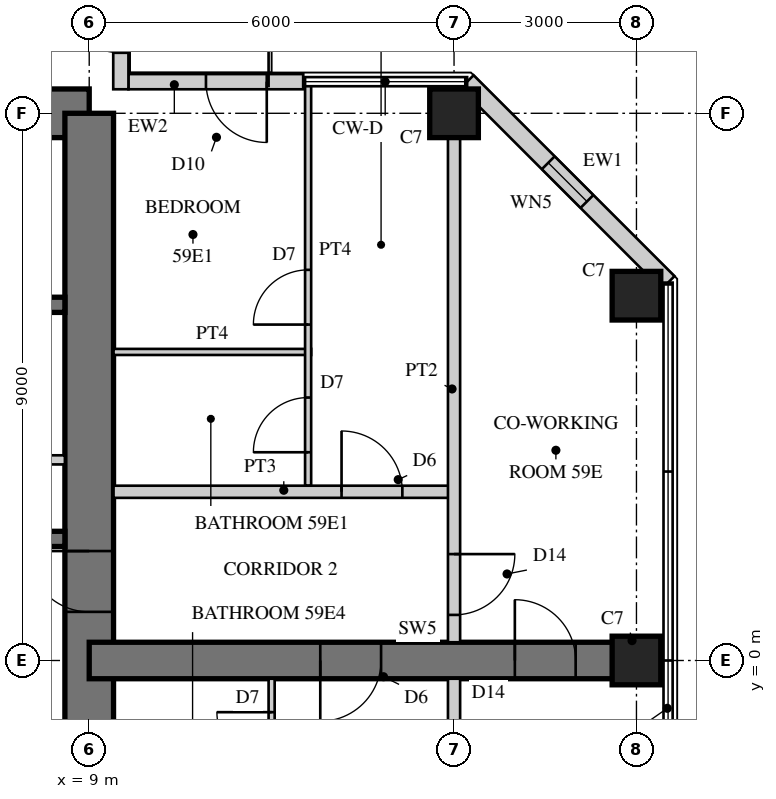
"""IFC4 building model, lengths in metres.
Left out: names, types, materials, properties, quantities, classifications, styles, units other than length and angle.
Written with IfcOpenShell. Run it as: python <this file> out.ifc"""

import sys

from ifc_helpers import new_model, si_unit, direction, frame, frame_2d, origin, origin_2d, place, context, subcontext, project, spatial, rectangle, hollow_rectangle, extrude, element, fill, save


model = new_model("IFC4")
c1 = context("Model", 3, precision=1e-05, world=origin(), true_north=direction((0.0, 1.0)))
c2 = subcontext(c1, "Body", "Model", "MODEL_VIEW")
j1 = project(units=[si_unit("LENGTHUNIT", "METRE"), si_unit("PLANEANGLEUNIT", "RADIAN")], contexts=[c1])
p1 = place(None, origin())
s1 = spatial("IfcSite", under=j1, at=p1, CompositionType="ELEMENT")
p2 = place(p1, origin())
s2 = spatial("IfcBuilding", under=s1, at=p2, CompositionType="ELEMENT")
p3 = place(p2, frame((0.0, 0.0, 232.3)))
s3 = spatial("IfcBuildingStorey", under=s2, at=p3, CompositionType="ELEMENT", Elevation=232.3)
p4 = place(p3, frame((9.0, 9.0, 0.0), z_axis=(0.0, 0.0, 1.0), x_axis=(-1.0, 0.0, 0.0)))
e1 = element("IfcWall", 1, at=p4, inside=s3, PredefinedType="SHEAR", context=c2, shape_type="SweptSolid", body=[
    extrude(rectangle(XDim=18.0, YDim=0.8, at=frame_2d((9.0, 0.0))), origin(), (0.0, 0.0, 1.0), 3.4),
])
p5 = place(p4, frame((9.8, 0.0, 0.0)))
e2 = element("IfcOpeningElement", 2, at=p5, cuts=e1, PredefinedType="OPENING", context=c2, shape_type="SweptSolid", body=[
    extrude(rectangle(XDim=1.0, YDim=2.4, at=frame_2d((0.5, 1.2))), frame((0.0, 0.41, 0.0), z_axis=(0.0, -1.0, 0.0), x_axis=(1.0, 0.0, 0.0)), (0.0, 0.0, 1.0), 0.82),
])
p6 = place(p3, frame((9.0, -9.0, 0.0), z_axis=(0.0, 0.0, 1.0), x_axis=(0.0, 1.0, 0.0)))
e3 = element("IfcWall", 3, at=p6, inside=s3, PredefinedType="SHEAR", context=c2, shape_type="SweptSolid", body=[
    extrude(rectangle(XDim=18.0, YDim=0.8, at=frame_2d((9.0, 0.0))), origin(), (0.0, 0.0, 1.0), 3.4),
])
p7 = place(p6, frame((9.8, 0.0, 0.0)))
e4 = element("IfcOpeningElement", 4, at=p7, cuts=e3, PredefinedType="OPENING", context=c2, shape_type="SweptSolid", body=[
    extrude(rectangle(XDim=1.0, YDim=2.4, at=frame_2d((0.5, 1.2))), frame((0.0, 0.41, 0.0), z_axis=(0.0, -1.0, 0.0), x_axis=(1.0, 0.0, 0.0)), (0.0, 0.0, 1.0), 0.82),
])
p8 = place(p3, frame((1.925, 2.0, 0.0), z_axis=(0.0, 0.0, 1.0), x_axis=(1.0, 0.0, 0.0)))
e5 = element("IfcWall", 5, at=p8, inside=s3, PredefinedType="SHEAR", context=c2, shape_type="SweptSolid", body=[
    extrude(rectangle(XDim=6.675, YDim=0.25, at=frame_2d((3.337, 0.0))), origin(), (0.0, 0.0, 1.0), 3.4),
])
p9 = place(p3, frame((1.925, 5.85, 0.0), z_axis=(0.0, 0.0, 1.0), x_axis=(1.0, 0.0, 0.0)))
e6 = element("IfcWall", 6, at=p9, inside=s3, PredefinedType="SHEAR", context=c2, shape_type="SweptSolid", body=[
    extrude(rectangle(XDim=6.675, YDim=0.25, at=frame_2d((3.337, 0.0))), origin(), (0.0, 0.0, 1.0), 3.4),
])
p10 = place(p9, frame((0.546, 0.0, 0.0)))
e7 = element("IfcOpeningElement", 7, at=p10, cuts=e6, PredefinedType="OPENING", context=c2, shape_type="SweptSolid", body=[
    extrude(rectangle(XDim=1.0, YDim=2.1, at=frame_2d((0.5, 1.05))), frame((0.0, 0.135, 0.0), z_axis=(0.0, -1.0, 0.0), x_axis=(1.0, 0.0, 0.0)), (0.0, 0.0, 1.0), 0.27),
])
p11 = place(p9, frame((5.129, 0.0, 0.0)))
e8 = element("IfcOpeningElement", 8, at=p11, cuts=e6, PredefinedType="OPENING", context=c2, shape_type="SweptSolid", body=[
    extrude(rectangle(XDim=1.0, YDim=2.1, at=frame_2d((0.5, 1.05))), frame((0.0, 0.135, 0.0), z_axis=(0.0, -1.0, 0.0), x_axis=(1.0, 0.0, 0.0)), (0.0, 0.0, 1.0), 0.27),
])
p12 = place(p3, frame((1.925, 3.3, 0.0), z_axis=(0.0, 0.0, 1.0), x_axis=(1.0, 0.0, 0.0)))
e9 = element("IfcWall", 9, at=p12, inside=s3, PredefinedType="PARTITIONING", context=c2, shape_type="SweptSolid", body=[
    extrude(rectangle(XDim=6.675, YDim=0.15, at=frame_2d((3.337, 0.0))), origin(), (0.0, 0.0, 1.0), 3.4),
])
p13 = place(p12, frame((0.075, 0.0, 0.0)))
e10 = element("IfcOpeningElement", 10, at=p13, cuts=e9, PredefinedType="OPENING", context=c2, shape_type="SweptSolid", body=[
    extrude(rectangle(XDim=0.8, YDim=2.1, at=frame_2d((0.4, 1.05))), frame((0.0, 0.085, 0.0), z_axis=(0.0, -1.0, 0.0), x_axis=(1.0, 0.0, 0.0)), (0.0, 0.0, 1.0), 0.17),
])
p14 = place(p12, frame((3.675, 0.0, 0.0)))
e11 = element("IfcOpeningElement", 11, at=p14, cuts=e9, PredefinedType="OPENING", context=c2, shape_type="SweptSolid", body=[
    extrude(rectangle(XDim=0.8, YDim=2.1, at=frame_2d((0.4, 1.05))), frame((0.0, 0.085, 0.0), z_axis=(0.0, -1.0, 0.0), x_axis=(1.0, 0.0, 0.0)), (0.0, 0.0, 1.0), 0.17),
])
p15 = place(p3, frame((9.0, 0.0, 0.0), z_axis=(0.0, 0.0, 1.0), x_axis=(1.0, 0.0, 0.0)))
e12 = element("IfcWall", 12, at=p15, inside=s3, PredefinedType="SHEAR", context=c2, shape_type="SweptSolid", body=[
    extrude(rectangle(XDim=9.0, YDim=0.6, at=frame_2d((4.5, 0.0))), origin(), (0.0, 0.0, 1.0), 3.4),
])
p16 = place(p15, frame((3.8, 0.0, 0.0)))
e13 = element("IfcOpeningElement", 13, at=p16, cuts=e12, PredefinedType="OPENING", context=c2, shape_type="SweptSolid", body=[
    extrude(rectangle(XDim=1.0, YDim=2.15, at=frame_2d((0.5, 1.075))), frame((0.0, 0.31, 0.0), z_axis=(0.0, -1.0, 0.0), x_axis=(1.0, 0.0, 0.0)), (0.0, 0.0, 1.0), 0.62),
])
p17 = place(p15, frame((7.0, 0.0, 0.0)))
e14 = element("IfcOpeningElement", 14, at=p17, cuts=e12, PredefinedType="OPENING", context=c2, shape_type="SweptSolid", body=[
    extrude(rectangle(XDim=1.0, YDim=2.2, at=frame_2d((0.5, 1.1))), frame((0.0, 0.31, 0.0), z_axis=(0.0, -1.0, 0.0), x_axis=(1.0, 0.0, 0.0)), (0.0, 0.0, 1.0), 0.62),
])
for number, where, z_axis, x_axis in (
    (15, (15.0, 9.0, 0.0), (0.0, 0.0, 1.0), (1.0, 0.0, 0.0)),
    (16, (18.0, 0.0, 0.0), (0.0, 0.0, 1.0), (1.0, 0.0, 0.0)),
    (17, (18.0, 6.0, 0.0), (0.0, 0.0, 1.0), (1.0, 0.0, 0.0)),
):
    element("IfcColumn", number, at=place(p3, frame(where, z_axis=z_axis, x_axis=x_axis)), inside=s3, PredefinedType="COLUMN", context=c2, shape_type="SweptSolid", body=[
        extrude(rectangle(XDim=0.8, YDim=0.8, at=origin_2d()), origin(), (0.0, 0.0, 1.0), 3.4),
    ])
p18 = place(p3, frame((18.52, 6.215, 0.0), z_axis=(0.0, 0.0, 1.0), x_axis=(-0.707106781187, 0.707106781187, 0.0)))
e18 = element("IfcWall", 18, at=p18, inside=s3, PredefinedType="SOLIDWALL", context=c2, shape_type="SweptSolid", body=[
    extrude(rectangle(XDim=4.674, YDim=0.3, at=frame_2d((2.337, 0.0))), origin(), (0.0, 0.0, 1.0), 3.22),
])
p19 = place(p18, frame((1.887, 0.0, 0.3)))
e19 = element("IfcOpeningElement", 19, at=p19, cuts=e18, PredefinedType="OPENING", context=c2, shape_type="SweptSolid", body=[
    extrude(rectangle(XDim=0.9, YDim=2.4, at=frame_2d((0.45, 1.2))), frame((0.0, 0.16, 0.0), z_axis=(0.0, -1.0, 0.0), x_axis=(1.0, 0.0, 0.0)), (0.0, 0.0, 1.0), 0.32),
])
p20 = place(p3, frame((12.52, 9.52, 0.0), z_axis=(0.0, 0.0, 1.0), x_axis=(-1.0, 0.0, 0.0)))
e20 = element("IfcWall", 20, at=p20, inside=s3, PredefinedType="SOLIDWALL", context=c2, shape_type="SweptSolid", body=[
    extrude(rectangle(XDim=2.875, YDim=0.25, at=frame_2d((1.438, 0.0))), origin(), (0.0, 0.0, 1.0), 3.22),
])
p21 = place(p20, frame((0.6, 0.0, 0.0)))
e21 = element("IfcOpeningElement", 21, at=p21, cuts=e20, PredefinedType="OPENING", context=c2, shape_type="SweptSolid", body=[
    extrude(rectangle(XDim=1.0, YDim=2.2, at=frame_2d((0.5, 1.1))), frame((0.0, 0.135, 0.0), z_axis=(0.0, -1.0, 0.0), x_axis=(1.0, 0.0, 0.0)), (0.0, 0.0, 1.0), 0.27),
])
p22 = place(p3, frame((9.52, 9.395, 0.0), z_axis=(0.0, 0.0, 1.0), x_axis=(0.0, 1.0, 0.0)))
e22 = element("IfcWall", 22, at=p22, inside=s3, PredefinedType="SOLIDWALL", context=c2, shape_type="SweptSolid", body=[
    extrude(rectangle(XDim=3.125, YDim=0.25, at=frame_2d((1.562, 0.0))), origin(), (0.0, 0.0, 1.0), 3.22),
])
p23 = place(p22, frame((0.6, 0.0, 0.0)))
e23 = element("IfcOpeningElement", 23, at=p23, cuts=e22, PredefinedType="OPENING", context=c2, shape_type="SweptSolid", body=[
    extrude(rectangle(XDim=1.0, YDim=2.2, at=frame_2d((0.5, 1.1))), frame((0.0, 0.135, 0.0), z_axis=(0.0, -1.0, 0.0), x_axis=(1.0, 0.0, 0.0)), (0.0, 0.0, 1.0), 0.27),
])
p24 = place(p3, frame((9.4, 5.075, 0.0), z_axis=(0.0, 0.0, 1.0), x_axis=(1.0, 0.0, 0.0)))
e24 = element("IfcWall", 24, at=p24, inside=s3, PredefinedType="PARTITIONING", context=c2, shape_type="SweptSolid", body=[
    extrude(rectangle(XDim=3.25, YDim=0.1, at=frame_2d((1.625, 0.0))), origin(), (0.0, 0.0, 1.0), 3.22),
])
p25 = place(p3, frame((12.6, 2.875, 0.0), z_axis=(0.0, 0.0, 1.0), x_axis=(0.0, 1.0, 0.0)))
e25 = element("IfcWall", 25, at=p25, inside=s3, PredefinedType="PARTITIONING", context=c2, shape_type="SweptSolid", body=[
    extrude(rectangle(XDim=6.605, YDim=0.1, at=frame_2d((3.302, 0.0))), origin(), (0.0, 0.0, 1.0), 3.22),
])
p26 = place(p25, frame((0.55, 0.0, 0.0)))
e26 = element("IfcOpeningElement", 26, at=p26, cuts=e25, PredefinedType="OPENING", context=c2, shape_type="SweptSolid", body=[
    extrude(rectangle(XDim=0.9, YDim=2.1, at=frame_2d((0.45, 1.05))), frame((0.0, 0.06, 0.0), z_axis=(0.0, -1.0, 0.0), x_axis=(1.0, 0.0, 0.0)), (0.0, 0.0, 1.0), 0.12),
])
p27 = place(p25, frame((2.65, 0.0, 0.0)))
e27 = element("IfcOpeningElement", 27, at=p27, cuts=e25, PredefinedType="OPENING", context=c2, shape_type="SweptSolid", body=[
    extrude(rectangle(XDim=0.9, YDim=2.1, at=frame_2d((0.45, 1.05))), frame((0.0, 0.06, 0.0), z_axis=(0.0, -1.0, 0.0), x_axis=(1.0, 0.0, 0.0)), (0.0, 0.0, 1.0), 0.12),
])
p28 = place(p3, frame((12.0, -9.395, 0.0), z_axis=(0.0, 0.0, 1.0), x_axis=(0.0, 1.0, 0.0)))
e28 = element("IfcWall", 28, at=p28, inside=s3, PredefinedType="PARTITIONING", context=c2, shape_type="SweptSolid", body=[
    extrude(rectangle(XDim=9.095, YDim=0.1, at=frame_2d((4.547, 0.0))), origin(), (0.0, 0.0, 1.0), 3.22),
])
p29 = place(p28, frame((5.545, 0.0, 0.0)))
e29 = element("IfcOpeningElement", 29, at=p29, cuts=e28, PredefinedType="OPENING", context=c2, shape_type="SweptSolid", body=[
    extrude(rectangle(XDim=0.9, YDim=2.1, at=frame_2d((0.45, 1.05))), frame((0.0, 0.06, 0.0), z_axis=(0.0, -1.0, 0.0), x_axis=(1.0, 0.0, 0.0)), (0.0, 0.0, 1.0), 0.12),
])
p30 = place(p28, frame((7.645, 0.0, 0.0)))
e30 = element("IfcOpeningElement", 30, at=p30, cuts=e28, PredefinedType="OPENING", context=c2, shape_type="SweptSolid", body=[
    extrude(rectangle(XDim=0.9, YDim=2.1, at=frame_2d((0.45, 1.05))), frame((0.0, 0.06, 0.0), z_axis=(0.0, -1.0, 0.0), x_axis=(1.0, 0.0, 0.0)), (0.0, 0.0, 1.0), 0.12),
])
p31 = place(p3, frame((9.4, 2.775, 0.0), z_axis=(0.0, 0.0, 1.0), x_axis=(1.0, 0.0, 0.0)))
e31 = element("IfcWall", 31, at=p31, inside=s3, PredefinedType="SOLIDWALL", context=c2, shape_type="SweptSolid", body=[
    extrude(rectangle(XDim=5.6, YDim=0.2, at=frame_2d((2.8, 0.0))), origin(), (0.0, 0.0, 1.0), 3.22),
])
p32 = place(p31, frame((3.75, 0.0, 0.0)))
e32 = element("IfcOpeningElement", 32, at=p32, cuts=e31, PredefinedType="OPENING", context=c2, shape_type="SweptSolid", body=[
    extrude(rectangle(XDim=1.0, YDim=2.15, at=frame_2d((0.5, 1.075))), frame((0.0, 0.11, 0.0), z_axis=(0.0, -1.0, 0.0), x_axis=(1.0, 0.0, 0.0)), (0.0, 0.0, 1.0), 0.22),
])
p33 = place(p3, frame((15.0, -8.6, 0.0), z_axis=(0.0, 0.0, 1.0), x_axis=(0.0, 1.0, 0.0)))
e33 = element("IfcWall", 33, at=p33, inside=s3, PredefinedType="SOLIDWALL", context=c2, shape_type="SweptSolid", body=[
    extrude(rectangle(XDim=8.3, YDim=0.2, at=frame_2d((4.15, 0.0))), origin(), (0.0, 0.0, 1.0), 2.52),
])
p34 = place(p3, frame((15.0, 0.3, 0.0), z_axis=(0.0, 0.0, 1.0), x_axis=(0.0, 1.0, 0.0)))
e34 = element("IfcWall", 34, at=p34, inside=s3, PredefinedType="SOLIDWALL", context=c2, shape_type="SweptSolid", body=[
    extrude(rectangle(XDim=8.3, YDim=0.2, at=frame_2d((4.15, 0.0))), origin(), (0.0, 0.0, 1.0), 2.52),
])
p35 = place(p34, frame((0.45, 0.0, 0.0)))
e35 = element("IfcOpeningElement", 35, at=p35, cuts=e34, PredefinedType="OPENING", context=c2, shape_type="SweptSolid", body=[
    extrude(rectangle(XDim=1.0, YDim=2.2, at=frame_2d((0.5, 1.1))), frame((0.0, 0.11, 0.0), z_axis=(0.0, -1.0, 0.0), x_axis=(1.0, 0.0, 0.0)), (0.0, 0.0, 1.0), 0.22),
])
p36 = place(p19, origin())
e36 = element("IfcWindow", 36, at=p36, inside=s3, PartitioningType="SINGLE_PANEL", PredefinedType="WINDOW", context=c2, shape_type="SweptSolid", body=[
    extrude(hollow_rectangle(XDim=0.9, YDim=2.4, WallThickness=0.06, at=frame_2d((0.45, 1.2))), frame((0.0, 0.03, 0.0), z_axis=(0.0, -1.0, 0.0), x_axis=(1.0, 0.0, 0.0)), (0.0, 0.0, 1.0), 0.06),
    extrude(rectangle(XDim=0.779, YDim=2.279, at=frame_2d((0.45, 1.2))), frame((0.0, 0.03, 0.0), z_axis=(0.0, -1.0, 0.0), x_axis=(1.0, 0.0, 0.0)), (0.0, 0.0, 1.0), 0.06),
])
fill(e19, e36)
p37 = place(p21, origin())
e37 = element("IfcDoor", 37, at=p37, inside=s3, OperationType="SINGLE_SWING_LEFT", PredefinedType="DOOR", context=c2, shape_type="SweptSolid", body=[
    extrude(hollow_rectangle(XDim=1.0, YDim=2.2, WallThickness=0.06, at=frame_2d((0.5, 1.1))), frame((0.0, 0.025, 0.0), z_axis=(0.0, -1.0, 0.0), x_axis=(1.0, 0.0, 0.0)), (0.0, 0.0, 1.0), 0.05),
    extrude(rectangle(XDim=0.879, YDim=2.079, at=frame_2d((0.5, 1.1))), frame((0.0, 0.025, 0.0), z_axis=(0.0, -1.0, 0.0), x_axis=(1.0, 0.0, 0.0)), (0.0, 0.0, 1.0), 0.05),
])
fill(e21, e37)
p38 = place(p23, origin())
e38 = element("IfcDoor", 38, at=p38, inside=s3, OperationType="SINGLE_SWING_RIGHT", PredefinedType="DOOR", context=c2, shape_type="SweptSolid", body=[
    extrude(hollow_rectangle(XDim=1.0, YDim=2.2, WallThickness=0.06, at=frame_2d((0.5, 1.1))), frame((0.0, 0.025, 0.0), z_axis=(0.0, -1.0, 0.0), x_axis=(1.0, 0.0, 0.0)), (0.0, 0.0, 1.0), 0.05),
    extrude(rectangle(XDim=0.879, YDim=2.079, at=frame_2d((0.5, 1.1))), frame((0.0, 0.025, 0.0), z_axis=(0.0, -1.0, 0.0), x_axis=(1.0, 0.0, 0.0)), (0.0, 0.0, 1.0), 0.05),
])
fill(e23, e38)
p39 = place(p26, origin())
e39 = element("IfcDoor", 39, at=p39, inside=s3, OperationType="SINGLE_SWING_LEFT", PredefinedType="DOOR", context=c2, shape_type="SweptSolid", body=[
    extrude(rectangle(XDim=0.9, YDim=2.1, at=frame_2d((0.45, 1.05))), frame((0.0, 0.025, 0.0), z_axis=(0.0, -1.0, 0.0), x_axis=(1.0, 0.0, 0.0)), (0.0, 0.0, 1.0), 0.05),
])
fill(e26, e39)
p40 = place(p27, origin())
e40 = element("IfcDoor", 40, at=p40, inside=s3, OperationType="SINGLE_SWING_LEFT", PredefinedType="DOOR", context=c2, shape_type="SweptSolid", body=[
    extrude(rectangle(XDim=0.9, YDim=2.1, at=frame_2d((0.45, 1.05))), frame((0.0, 0.025, 0.0), z_axis=(0.0, -1.0, 0.0), x_axis=(1.0, 0.0, 0.0)), (0.0, 0.0, 1.0), 0.05),
])
fill(e27, e40)
p41 = place(p30, origin())
e41 = element("IfcDoor", 41, at=p41, inside=s3, OperationType="SINGLE_SWING_RIGHT", PredefinedType="DOOR", context=c2, shape_type="SweptSolid", body=[
    extrude(rectangle(XDim=0.9, YDim=2.1, at=frame_2d((0.45, 1.05))), frame((0.0, 0.025, 0.0), z_axis=(0.0, -1.0, 0.0), x_axis=(1.0, 0.0, 0.0)), (0.0, 0.0, 1.0), 0.05),
])
fill(e30, e41)
p42 = place(p32, origin())
e42 = element("IfcDoor", 42, at=p42, inside=s3, OperationType="SINGLE_SWING_LEFT", PredefinedType="DOOR", context=c2, shape_type="SweptSolid", body=[
    extrude(rectangle(XDim=1.0, YDim=2.15, at=frame_2d((0.5, 1.075))), frame((0.0, 0.025, 0.0), z_axis=(0.0, -1.0, 0.0), x_axis=(1.0, 0.0, 0.0)), (0.0, 0.0, 1.0), 0.05),
])
fill(e32, e42)
p43 = place(p35, frame((1.0, 0.0, 0.0), z_axis=(0.0, 0.0, 1.0), x_axis=(-1.0, 0.0, 0.0)))
e43 = element("IfcDoor", 43, at=p43, inside=s3, OperationType="SINGLE_SWING_LEFT", PredefinedType="DOOR", context=c2, shape_type="SweptSolid", body=[
    extrude(rectangle(XDim=1.0, YDim=2.2, at=frame_2d((0.5, 1.1))), frame((0.0, 0.025, 0.0), z_axis=(0.0, -1.0, 0.0), x_axis=(1.0, 0.0, 0.0)), (0.0, 0.0, 1.0), 0.05),
])
fill(e35, e43)
p44 = place(p16, frame((1.0, 0.0, 0.0), z_axis=(0.0, 0.0, 1.0), x_axis=(-1.0, 0.0, 0.0)))
e44 = element("IfcDoor", 44, at=p44, inside=s3, OperationType="SINGLE_SWING_RIGHT", PredefinedType="DOOR", context=c2, shape_type="SweptSolid", body=[
    extrude(rectangle(XDim=1.0, YDim=2.15, at=frame_2d((0.5, 1.075))), frame((0.0, 0.025, 0.0), z_axis=(0.0, -1.0, 0.0), x_axis=(1.0, 0.0, 0.0)), (0.0, 0.0, 1.0), 0.05),
])
fill(e13, e44)
p45 = place(p17, origin())
e45 = element("IfcDoor", 45, at=p45, inside=s3, OperationType="SINGLE_SWING_LEFT", PredefinedType="DOOR", context=c2, shape_type="SweptSolid", body=[
    extrude(rectangle(XDim=1.0, YDim=2.2, at=frame_2d((0.5, 1.1))), frame((0.0, 0.025, 0.0), z_axis=(0.0, -1.0, 0.0), x_axis=(1.0, 0.0, 0.0)), (0.0, 0.0, 1.0), 0.05),
])
fill(e14, e45)
p46 = place(p7, origin())
e46 = element("IfcDoor", 46, at=p46, inside=s3, OperationType="SINGLE_SWING_RIGHT", PredefinedType="DOOR", context=c2, shape_type="SweptSolid", body=[
    extrude(rectangle(XDim=1.0, YDim=2.4, at=frame_2d((0.5, 1.2))), frame((0.0, 0.055, 0.0), z_axis=(0.0, -1.0, 0.0), x_axis=(1.0, 0.0, 0.0)), (0.0, 0.0, 1.0), 0.05),
])
fill(e4, e46)
save(model, sys.argv[1])
